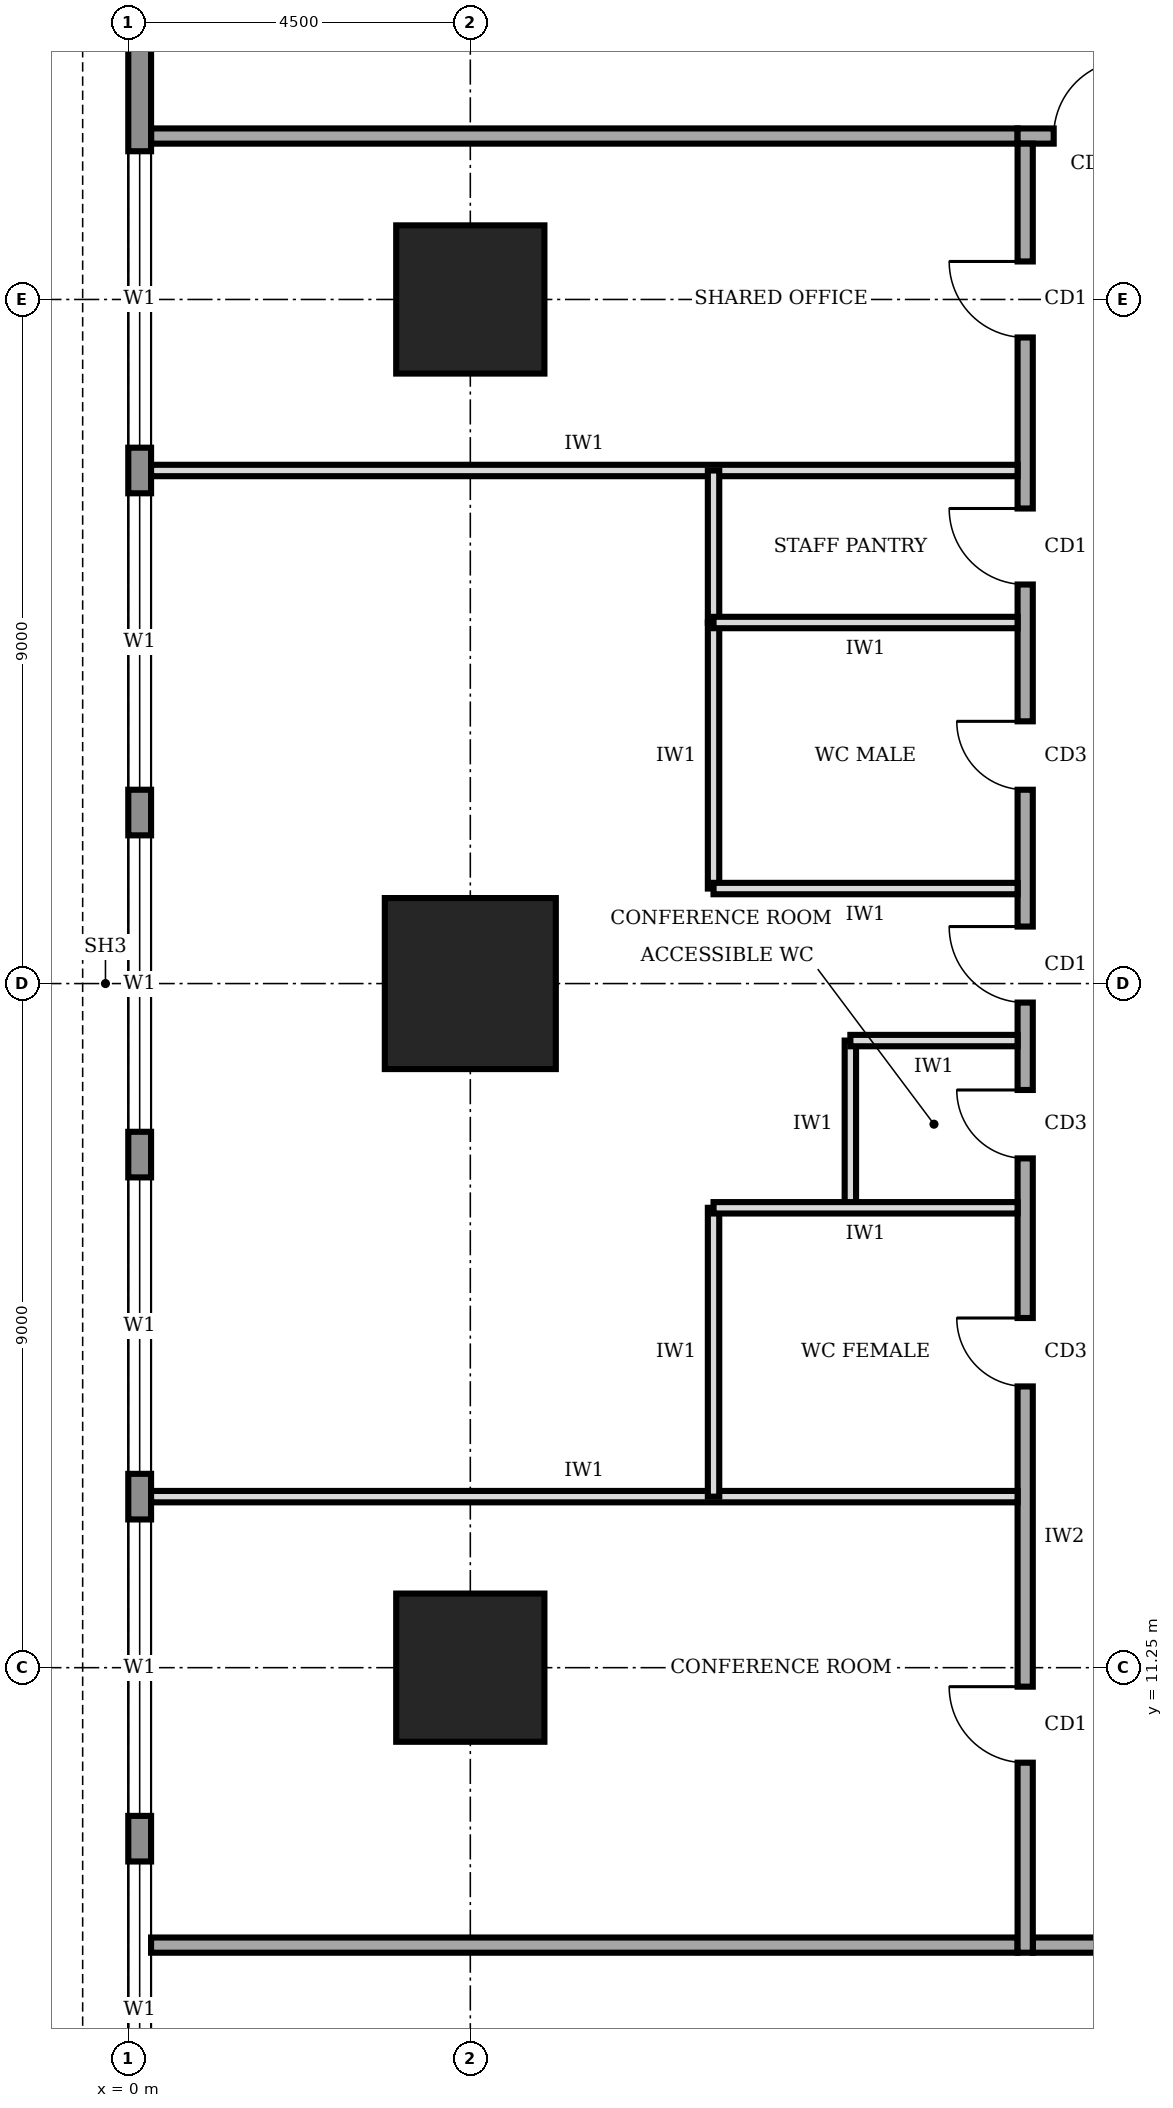
"""IFC4 building model, lengths in metres.
Left out: names, types, materials, properties, quantities, classifications, styles, units other than length and angle.
Written with IfcOpenShell. Run it as: python <this file> out.ifc"""

import sys

from ifc_helpers import new_model, si_unit, direction, frame, frame_2d, origin, origin_2d, place, context, subcontext, project, spatial, rectangle, extrude, element, fill, save


model = new_model("IFC4")
c1 = context("Model", 3, precision=1e-05, world=origin(), true_north=direction((0.0, 1.0)))
c2 = subcontext(c1, "Body", "Model", "MODEL_VIEW")
j1 = project(units=[si_unit("LENGTHUNIT", "METRE"), si_unit("PLANEANGLEUNIT", "RADIAN")], contexts=[c1])
p1 = place(None, origin())
s1 = spatial("IfcSite", under=j1, at=p1, CompositionType="ELEMENT")
p2 = place(p1, origin())
s2 = spatial("IfcBuilding", under=s1, at=p2, CompositionType="ELEMENT")
p3 = place(p2, frame((0.0, 0.0, 205.0)))
s3 = spatial("IfcBuildingStorey", under=s2, at=p3, CompositionType="ELEMENT", Elevation=205.0)
p4 = place(p3, frame((4.5, 11.25, 0.0), z_axis=(0.0, 0.0, 1.0), x_axis=(1.0, 0.0, 0.0)))
e1 = element("IfcColumn", 1, at=p4, inside=s3, PredefinedType="COLUMN", context=c2, shape_type="SweptSolid", body=[
    extrude(rectangle(XDim=1.95, YDim=1.95, at=origin_2d()), origin(), (0.0, 0.0, 1.0), 4.0),
])
p5 = place(p3, frame((4.5, 20.25, 0.0), z_axis=(0.0, 0.0, 1.0), x_axis=(1.0, 0.0, 0.0)))
e2 = element("IfcColumn", 2, at=p5, inside=s3, PredefinedType="COLUMN", context=c2, shape_type="SweptSolid", body=[
    extrude(rectangle(XDim=2.25, YDim=2.25, at=origin_2d()), origin(), (0.0, 0.0, 1.0), 4.0),
])
p6 = place(p3, frame((4.5, 29.25, 0.0), z_axis=(0.0, 0.0, 1.0), x_axis=(1.0, 0.0, 0.0)))
e3 = element("IfcColumn", 3, at=p6, inside=s3, PredefinedType="COLUMN", context=c2, shape_type="SweptSolid", body=[
    extrude(rectangle(XDim=1.95, YDim=1.95, at=origin_2d()), origin(), (0.0, 0.0, 1.0), 4.0),
])
p7 = place(p3, frame((0.15, 35.98, 0.0), z_axis=(0.0, 0.0, 1.0), x_axis=(0.0, -1.0, 0.0)))
e4 = element("IfcWall", 4, at=p7, inside=s3, PredefinedType="STANDARD", context=c2, shape_type="SweptSolid", body=[
    extrude(rectangle(XDim=31.46, YDim=0.3, at=frame_2d((15.73, 0.0))), origin(), (0.0, 0.0, 1.0), 3.75),
])
p8 = place(p7, frame((27.28, 0.0, 0.9)))
e5 = element("IfcOpeningElement", 5, at=p8, cuts=e4, PredefinedType="OPENING", context=c2, shape_type="SweptSolid", body=[
    extrude(rectangle(XDim=3.9, YDim=2.2, at=frame_2d((1.95, 1.1))), frame((0.0, 0.16, 0.0), z_axis=(0.0, -1.0, 0.0), x_axis=(1.0, 0.0, 0.0)), (0.0, 0.0, 1.0), 0.32),
])
p9 = place(p7, frame((22.78, 0.0, 0.9)))
e6 = element("IfcOpeningElement", 6, at=p9, cuts=e4, PredefinedType="OPENING", context=c2, shape_type="SweptSolid", body=[
    extrude(rectangle(XDim=3.9, YDim=2.2, at=frame_2d((1.95, 1.1))), frame((0.0, 0.16, 0.0), z_axis=(0.0, -1.0, 0.0), x_axis=(1.0, 0.0, 0.0)), (0.0, 0.0, 1.0), 0.32),
])
p10 = place(p7, frame((18.28, 0.0, 0.9)))
e7 = element("IfcOpeningElement", 7, at=p10, cuts=e4, PredefinedType="OPENING", context=c2, shape_type="SweptSolid", body=[
    extrude(rectangle(XDim=3.9, YDim=2.2, at=frame_2d((1.95, 1.1))), frame((0.0, 0.16, 0.0), z_axis=(0.0, -1.0, 0.0), x_axis=(1.0, 0.0, 0.0)), (0.0, 0.0, 1.0), 0.32),
])
p11 = place(p7, frame((13.78, 0.0, 0.9)))
e8 = element("IfcOpeningElement", 8, at=p11, cuts=e4, PredefinedType="OPENING", context=c2, shape_type="SweptSolid", body=[
    extrude(rectangle(XDim=3.9, YDim=2.2, at=frame_2d((1.95, 1.1))), frame((0.0, 0.16, 0.0), z_axis=(0.0, -1.0, 0.0), x_axis=(1.0, 0.0, 0.0)), (0.0, 0.0, 1.0), 0.32),
])
p12 = place(p7, frame((9.28, 0.0, 0.9)))
e9 = element("IfcOpeningElement", 9, at=p12, cuts=e4, PredefinedType="OPENING", context=c2, shape_type="SweptSolid", body=[
    extrude(rectangle(XDim=3.9, YDim=2.2, at=frame_2d((1.95, 1.1))), frame((0.0, 0.16, 0.0), z_axis=(0.0, -1.0, 0.0), x_axis=(1.0, 0.0, 0.0)), (0.0, 0.0, 1.0), 0.32),
])
p13 = place(p7, frame((4.78, 0.0, 0.9)))
e10 = element("IfcOpeningElement", 10, at=p13, cuts=e4, PredefinedType="OPENING", context=c2, shape_type="SweptSolid", body=[
    extrude(rectangle(XDim=3.9, YDim=2.2, at=frame_2d((1.95, 1.1))), frame((0.0, 0.16, 0.0), z_axis=(0.0, -1.0, 0.0), x_axis=(1.0, 0.0, 0.0)), (0.0, 0.0, 1.0), 0.32),
])
p14 = place(p3, frame((11.9, 7.6, 0.0), z_axis=(0.0, 0.0, 1.0), x_axis=(1.0, 0.0, 0.0)))
e11 = element("IfcWall", 11, at=p14, inside=s3, PredefinedType="SOLIDWALL", context=c2, shape_type="SweptSolid", body=[
    extrude(rectangle(XDim=16.9, YDim=0.2, at=frame_2d((8.45, 0.0))), origin(), (0.0, 0.0, 1.0), 3.75),
])
p15 = place(p3, frame((28.6, 31.4, 0.0), z_axis=(0.0, 0.0, 1.0), x_axis=(-1.0, 0.0, 0.0)))
e12 = element("IfcWall", 12, at=p15, inside=s3, PredefinedType="SOLIDWALL", context=c2, shape_type="SweptSolid", body=[
    extrude(rectangle(XDim=16.9, YDim=0.2, at=frame_2d((8.45, 0.0))), origin(), (0.0, 0.0, 1.0), 3.75),
])
p16 = place(p15, frame((15.425, 0.0, 0.0)))
e13 = element("IfcOpeningElement", 13, at=p16, cuts=e12, PredefinedType="OPENING", context=c2, shape_type="SweptSolid", body=[
    extrude(rectangle(XDim=1.0, YDim=2.1, at=frame_2d((0.5, 1.05))), frame((0.0, 0.11, 0.0), z_axis=(0.0, -1.0, 0.0), x_axis=(1.0, 0.0, 0.0)), (0.0, 0.0, 1.0), 0.22),
])
p17 = place(p15, frame((12.35, 0.0, 0.0)))
e14 = element("IfcOpeningElement", 14, at=p17, cuts=e12, PredefinedType="OPENING", context=c2, shape_type="SweptSolid", body=[
    extrude(rectangle(XDim=1.0, YDim=2.1, at=frame_2d((0.5, 1.05))), frame((0.0, 0.11, 0.0), z_axis=(0.0, -1.0, 0.0), x_axis=(1.0, 0.0, 0.0)), (0.0, 0.0, 1.0), 0.22),
])
p18 = place(p15, frame((5.6, 0.0, 0.0)))
e15 = element("IfcOpeningElement", 15, at=p18, cuts=e12, PredefinedType="OPENING", context=c2, shape_type="SweptSolid", body=[
    extrude(rectangle(XDim=1.0, YDim=2.1, at=frame_2d((0.5, 1.05))), frame((0.0, 0.11, 0.0), z_axis=(0.0, -1.0, 0.0), x_axis=(1.0, 0.0, 0.0)), (0.0, 0.0, 1.0), 0.22),
])
p19 = place(p15, frame((0.275, 0.0, 0.0)))
e16 = element("IfcOpeningElement", 16, at=p19, cuts=e12, PredefinedType="OPENING", context=c2, shape_type="SweptSolid", body=[
    extrude(rectangle(XDim=1.0, YDim=2.1, at=frame_2d((0.5, 1.05))), frame((0.0, 0.11, 0.0), z_axis=(0.0, -1.0, 0.0), x_axis=(1.0, 0.0, 0.0)), (0.0, 0.0, 1.0), 0.22),
])
p20 = place(p3, frame((11.8, 31.3, 0.0), z_axis=(0.0, 0.0, 1.0), x_axis=(0.0, -1.0, 0.0)))
e17 = element("IfcWall", 17, at=p20, inside=s3, PredefinedType="SOLIDWALL", context=c2, shape_type="SweptSolid", body=[
    extrude(rectangle(XDim=23.8, YDim=0.2, at=frame_2d((11.9, 0.0))), origin(), (0.0, 0.0, 1.0), 3.75),
])
p21 = place(p20, frame((20.3, 0.0, 0.0)))
e18 = element("IfcOpeningElement", 18, at=p21, cuts=e17, PredefinedType="OPENING", context=c2, shape_type="SweptSolid", body=[
    extrude(rectangle(XDim=1.0, YDim=2.1, at=frame_2d((0.5, 1.05))), frame((0.0, 0.11, 0.0), z_axis=(0.0, -1.0, 0.0), x_axis=(1.0, 0.0, 0.0)), (0.0, 0.0, 1.0), 0.22),
])
p22 = place(p20, frame((15.45, 0.0, 0.0)))
e19 = element("IfcOpeningElement", 19, at=p22, cuts=e17, PredefinedType="OPENING", context=c2, shape_type="SweptSolid", body=[
    extrude(rectangle(XDim=0.9, YDim=2.1, at=frame_2d((0.45, 1.05))), frame((0.0, 0.11, 0.0), z_axis=(0.0, -1.0, 0.0), x_axis=(1.0, 0.0, 0.0)), (0.0, 0.0, 1.0), 0.22),
])
p23 = place(p20, frame((12.45, 0.0, 0.0)))
e20 = element("IfcOpeningElement", 20, at=p23, cuts=e17, PredefinedType="OPENING", context=c2, shape_type="SweptSolid", body=[
    extrude(rectangle(XDim=0.9, YDim=2.1, at=frame_2d((0.45, 1.05))), frame((0.0, 0.11, 0.0), z_axis=(0.0, -1.0, 0.0), x_axis=(1.0, 0.0, 0.0)), (0.0, 0.0, 1.0), 0.22),
])
p24 = place(p20, frame((7.6, 0.0, 0.0)))
e21 = element("IfcOpeningElement", 21, at=p24, cuts=e17, PredefinedType="OPENING", context=c2, shape_type="SweptSolid", body=[
    extrude(rectangle(XDim=0.9, YDim=2.1, at=frame_2d((0.45, 1.05))), frame((0.0, 0.11, 0.0), z_axis=(0.0, -1.0, 0.0), x_axis=(1.0, 0.0, 0.0)), (0.0, 0.0, 1.0), 0.22),
])
p25 = place(p20, frame((4.8, 0.0, 0.0)))
e22 = element("IfcOpeningElement", 22, at=p25, cuts=e17, PredefinedType="OPENING", context=c2, shape_type="SweptSolid", body=[
    extrude(rectangle(XDim=1.0, YDim=2.1, at=frame_2d((0.5, 1.05))), frame((0.0, 0.11, 0.0), z_axis=(0.0, -1.0, 0.0), x_axis=(1.0, 0.0, 0.0)), (0.0, 0.0, 1.0), 0.22),
])
p26 = place(p20, frame((10.3, 0.0, 0.0)))
e23 = element("IfcOpeningElement", 23, at=p26, cuts=e17, PredefinedType="OPENING", context=c2, shape_type="SweptSolid", body=[
    extrude(rectangle(XDim=1.0, YDim=2.1, at=frame_2d((0.5, 1.05))), frame((0.0, 0.11, 0.0), z_axis=(0.0, -1.0, 0.0), x_axis=(1.0, 0.0, 0.0)), (0.0, 0.0, 1.0), 0.22),
])
p27 = place(p20, frame((1.55, 0.0, 0.0)))
e24 = element("IfcOpeningElement", 24, at=p27, cuts=e17, PredefinedType="OPENING", context=c2, shape_type="SweptSolid", body=[
    extrude(rectangle(XDim=1.0, YDim=2.1, at=frame_2d((0.5, 1.05))), frame((0.0, 0.11, 0.0), z_axis=(0.0, -1.0, 0.0), x_axis=(1.0, 0.0, 0.0)), (0.0, 0.0, 1.0), 0.22),
])
for number, where, z_axis, x_axis in (
    (25, (0.3, 7.6, 0.0), (0.0, 0.0, 1.0), (1.0, 0.0, 0.0)),
    (26, (0.3, 31.4, 0.0), (0.0, 0.0, 1.0), (1.0, 0.0, 0.0)),
):
    element("IfcWall", number, at=place(p3, frame(where, z_axis=z_axis, x_axis=x_axis)), inside=s3, PredefinedType="SOLIDWALL", context=c2, shape_type="SweptSolid", body=[
        extrude(rectangle(XDim=11.4, YDim=0.2, at=frame_2d((5.7, 0.0))), origin(), (0.0, 0.0, 1.0), 3.75),
    ])
for number, where, z_axis, x_axis in (
    (27, (0.3, 13.5, 0.0), (0.0, 0.0, 1.0), (1.0, 0.0, 0.0)),
    (28, (0.3, 27.0, 0.0), (0.0, 0.0, 1.0), (1.0, 0.0, 0.0)),
):
    element("IfcWall", number, at=place(p3, frame(where, z_axis=z_axis, x_axis=x_axis)), inside=s3, PredefinedType="PARTITIONING", context=c2, shape_type="SweptSolid", body=[
        extrude(rectangle(XDim=11.4, YDim=0.15, at=frame_2d((5.7, 0.0))), origin(), (0.0, 0.0, 1.0), 3.75),
    ])
p28 = place(p3, frame((11.7, 17.3, 0.0), z_axis=(0.0, 0.0, 1.0), x_axis=(-1.0, 0.0, 0.0)))
e29 = element("IfcWall", 29, at=p28, inside=s3, PredefinedType="PARTITIONING", context=c2, shape_type="SweptSolid", body=[
    extrude(rectangle(XDim=4.0, YDim=0.15, at=frame_2d((2.0, 0.0))), origin(), (0.0, 0.0, 1.0), 3.75),
])
p29 = place(p3, frame((11.7, 19.5, 0.0), z_axis=(0.0, 0.0, 1.0), x_axis=(-1.0, 0.0, 0.0)))
e30 = element("IfcWall", 30, at=p29, inside=s3, PredefinedType="PARTITIONING", context=c2, shape_type="SweptSolid", body=[
    extrude(rectangle(XDim=2.2, YDim=0.15, at=frame_2d((1.1, 0.0))), origin(), (0.0, 0.0, 1.0), 2.85),
])
for number, where, z_axis, x_axis in (
    (31, (11.7, 21.5, 0.0), (0.0, 0.0, 1.0), (-1.0, 0.0, 0.0)),
    (32, (11.7, 25.0, 0.0), (0.0, 0.0, 1.0), (-1.0, 0.0, 0.0)),
):
    element("IfcWall", number, at=place(p3, frame(where, z_axis=z_axis, x_axis=x_axis)), inside=s3, PredefinedType="PARTITIONING", context=c2, shape_type="SweptSolid", body=[
        extrude(rectangle(XDim=4.0, YDim=0.15, at=frame_2d((2.0, 0.0))), origin(), (0.0, 0.0, 1.0), 3.75),
    ])
p30 = place(p3, frame((7.7, 13.5, 0.0), z_axis=(0.0, 0.0, 1.0), x_axis=(0.0, 1.0, 0.0)))
e33 = element("IfcWall", 33, at=p30, inside=s3, PredefinedType="PARTITIONING", context=c2, shape_type="SweptSolid", body=[
    extrude(rectangle(XDim=3.8, YDim=0.15, at=frame_2d((1.9, 0.0))), origin(), (0.0, 0.0, 1.0), 3.75),
])
p31 = place(p3, frame((9.5, 17.3, 0.0), z_axis=(0.0, 0.0, 1.0), x_axis=(0.0, 1.0, 0.0)))
e34 = element("IfcWall", 34, at=p31, inside=s3, PredefinedType="PARTITIONING", context=c2, shape_type="SweptSolid", body=[
    extrude(rectangle(XDim=2.2, YDim=0.15, at=frame_2d((1.1, 0.0))), origin(), (0.0, 0.0, 1.0), 3.75),
])
p32 = place(p3, frame((7.7, 21.5, 0.0), z_axis=(0.0, 0.0, 1.0), x_axis=(0.0, 1.0, 0.0)))
e35 = element("IfcWall", 35, at=p32, inside=s3, PredefinedType="PARTITIONING", context=c2, shape_type="SweptSolid", body=[
    extrude(rectangle(XDim=3.5, YDim=0.15, at=frame_2d((1.75, 0.0))), origin(), (0.0, 0.0, 1.0), 3.75),
])
p33 = place(p3, frame((7.7, 25.0, 0.0), z_axis=(0.0, 0.0, 1.0), x_axis=(0.0, 1.0, 0.0)))
e36 = element("IfcWall", 36, at=p33, inside=s3, PredefinedType="PARTITIONING", context=c2, shape_type="SweptSolid", body=[
    extrude(rectangle(XDim=2.0, YDim=0.15, at=frame_2d((1.0, 0.0))), origin(), (0.0, 0.0, 1.0), 3.75),
])
p34 = place(p8, origin())
e37 = element("IfcWindow", 37, at=p34, inside=s3, PartitioningType="SINGLE_PANEL", PredefinedType="WINDOW", context=c2, shape_type="SweptSolid", body=[
    extrude(rectangle(XDim=3.9, YDim=2.2, at=frame_2d((1.95, 1.1))), frame((0.0, 0.03, 0.0), z_axis=(0.0, -1.0, 0.0), x_axis=(1.0, 0.0, 0.0)), (0.0, 0.0, 1.0), 0.06),
])
fill(e5, e37)
p35 = place(p9, origin())
e38 = element("IfcWindow", 38, at=p35, inside=s3, PartitioningType="SINGLE_PANEL", PredefinedType="WINDOW", context=c2, shape_type="SweptSolid", body=[
    extrude(rectangle(XDim=3.9, YDim=2.2, at=frame_2d((1.95, 1.1))), frame((0.0, 0.03, 0.0), z_axis=(0.0, -1.0, 0.0), x_axis=(1.0, 0.0, 0.0)), (0.0, 0.0, 1.0), 0.06),
])
fill(e6, e38)
p36 = place(p10, origin())
e39 = element("IfcWindow", 39, at=p36, inside=s3, PartitioningType="SINGLE_PANEL", PredefinedType="WINDOW", context=c2, shape_type="SweptSolid", body=[
    extrude(rectangle(XDim=3.9, YDim=2.2, at=frame_2d((1.95, 1.1))), frame((0.0, 0.03, 0.0), z_axis=(0.0, -1.0, 0.0), x_axis=(1.0, 0.0, 0.0)), (0.0, 0.0, 1.0), 0.06),
])
fill(e7, e39)
p37 = place(p11, origin())
e40 = element("IfcWindow", 40, at=p37, inside=s3, PartitioningType="SINGLE_PANEL", PredefinedType="WINDOW", context=c2, shape_type="SweptSolid", body=[
    extrude(rectangle(XDim=3.9, YDim=2.2, at=frame_2d((1.95, 1.1))), frame((0.0, 0.03, 0.0), z_axis=(0.0, -1.0, 0.0), x_axis=(1.0, 0.0, 0.0)), (0.0, 0.0, 1.0), 0.06),
])
fill(e8, e40)
p38 = place(p12, origin())
e41 = element("IfcWindow", 41, at=p38, inside=s3, PartitioningType="SINGLE_PANEL", PredefinedType="WINDOW", context=c2, shape_type="SweptSolid", body=[
    extrude(rectangle(XDim=3.9, YDim=2.2, at=frame_2d((1.95, 1.1))), frame((0.0, 0.03, 0.0), z_axis=(0.0, -1.0, 0.0), x_axis=(1.0, 0.0, 0.0)), (0.0, 0.0, 1.0), 0.06),
])
fill(e9, e41)
p39 = place(p13, origin())
e42 = element("IfcWindow", 42, at=p39, inside=s3, PartitioningType="SINGLE_PANEL", PredefinedType="WINDOW", context=c2, shape_type="SweptSolid", body=[
    extrude(rectangle(XDim=3.9, YDim=2.2, at=frame_2d((1.95, 1.1))), frame((0.0, 0.03, 0.0), z_axis=(0.0, -1.0, 0.0), x_axis=(1.0, 0.0, 0.0)), (0.0, 0.0, 1.0), 0.06),
])
fill(e10, e42)
p40 = place(p16, frame((1.0, 0.0, 0.0), z_axis=(0.0, 0.0, 1.0), x_axis=(-1.0, 0.0, 0.0)))
e43 = element("IfcDoor", 43, at=p40, inside=s3, OperationType="SINGLE_SWING_RIGHT", PredefinedType="DOOR", context=c2, shape_type="SweptSolid", body=[
    extrude(rectangle(XDim=1.0, YDim=2.1, at=frame_2d((0.5, 1.05))), frame((0.0, 0.025, 0.0), z_axis=(0.0, -1.0, 0.0), x_axis=(1.0, 0.0, 0.0)), (0.0, 0.0, 1.0), 0.05),
])
fill(e13, e43)
p41 = place(p21, frame((1.0, 0.0, 0.0), z_axis=(0.0, 0.0, 1.0), x_axis=(-1.0, 0.0, 0.0)))
e44 = element("IfcDoor", 44, at=p41, inside=s3, OperationType="SINGLE_SWING_RIGHT", PredefinedType="DOOR", context=c2, shape_type="SweptSolid", body=[
    extrude(rectangle(XDim=1.0, YDim=2.1, at=frame_2d((0.5, 1.05))), frame((0.0, 0.025, 0.0), z_axis=(0.0, -1.0, 0.0), x_axis=(1.0, 0.0, 0.0)), (0.0, 0.0, 1.0), 0.05),
])
fill(e18, e44)
p42 = place(p22, frame((0.9, 0.0, 0.0), z_axis=(0.0, 0.0, 1.0), x_axis=(-1.0, 0.0, 0.0)))
e45 = element("IfcDoor", 45, at=p42, inside=s3, OperationType="SINGLE_SWING_RIGHT", PredefinedType="DOOR", context=c2, shape_type="SweptSolid", body=[
    extrude(rectangle(XDim=0.9, YDim=2.1, at=frame_2d((0.45, 1.05))), frame((0.0, 0.025, 0.0), z_axis=(0.0, -1.0, 0.0), x_axis=(1.0, 0.0, 0.0)), (0.0, 0.0, 1.0), 0.05),
])
fill(e19, e45)
p43 = place(p23, frame((0.9, 0.0, 0.0), z_axis=(0.0, 0.0, 1.0), x_axis=(-1.0, 0.0, 0.0)))
e46 = element("IfcDoor", 46, at=p43, inside=s3, OperationType="SINGLE_SWING_RIGHT", PredefinedType="DOOR", context=c2, shape_type="SweptSolid", body=[
    extrude(rectangle(XDim=0.9, YDim=2.1, at=frame_2d((0.45, 1.05))), frame((0.0, 0.025, 0.0), z_axis=(0.0, -1.0, 0.0), x_axis=(1.0, 0.0, 0.0)), (0.0, 0.0, 1.0), 0.05),
])
fill(e20, e46)
p44 = place(p24, frame((0.9, 0.0, 0.0), z_axis=(0.0, 0.0, 1.0), x_axis=(-1.0, 0.0, 0.0)))
e47 = element("IfcDoor", 47, at=p44, inside=s3, OperationType="SINGLE_SWING_RIGHT", PredefinedType="DOOR", context=c2, shape_type="SweptSolid", body=[
    extrude(rectangle(XDim=0.9, YDim=2.1, at=frame_2d((0.45, 1.05))), frame((0.0, 0.025, 0.0), z_axis=(0.0, -1.0, 0.0), x_axis=(1.0, 0.0, 0.0)), (0.0, 0.0, 1.0), 0.05),
])
fill(e21, e47)
p45 = place(p25, frame((1.0, 0.0, 0.0), z_axis=(0.0, 0.0, 1.0), x_axis=(-1.0, 0.0, 0.0)))
e48 = element("IfcDoor", 48, at=p45, inside=s3, OperationType="SINGLE_SWING_RIGHT", PredefinedType="DOOR", context=c2, shape_type="SweptSolid", body=[
    extrude(rectangle(XDim=1.0, YDim=2.1, at=frame_2d((0.5, 1.05))), frame((0.0, 0.025, 0.0), z_axis=(0.0, -1.0, 0.0), x_axis=(1.0, 0.0, 0.0)), (0.0, 0.0, 1.0), 0.05),
])
fill(e22, e48)
p46 = place(p26, frame((1.0, 0.0, 0.0), z_axis=(0.0, 0.0, 1.0), x_axis=(-1.0, 0.0, 0.0)))
e49 = element("IfcDoor", 49, at=p46, inside=s3, OperationType="SINGLE_SWING_RIGHT", PredefinedType="DOOR", context=c2, shape_type="SweptSolid", body=[
    extrude(rectangle(XDim=1.0, YDim=2.1, at=frame_2d((0.5, 1.05))), frame((0.0, 0.025, 0.0), z_axis=(0.0, -1.0, 0.0), x_axis=(1.0, 0.0, 0.0)), (0.0, 0.0, 1.0), 0.05),
])
fill(e23, e49)
p47 = place(p27, frame((1.0, 0.0, 0.0), z_axis=(0.0, 0.0, 1.0), x_axis=(-1.0, 0.0, 0.0)))
e50 = element("IfcDoor", 50, at=p47, inside=s3, OperationType="SINGLE_SWING_RIGHT", PredefinedType="DOOR", context=c2, shape_type="SweptSolid", body=[
    extrude(rectangle(XDim=1.0, YDim=2.1, at=frame_2d((0.5, 1.05))), frame((0.0, 0.025, 0.0), z_axis=(0.0, -1.0, 0.0), x_axis=(1.0, 0.0, 0.0)), (0.0, 0.0, 1.0), 0.05),
])
fill(e24, e50)
save(model, sys.argv[1])
